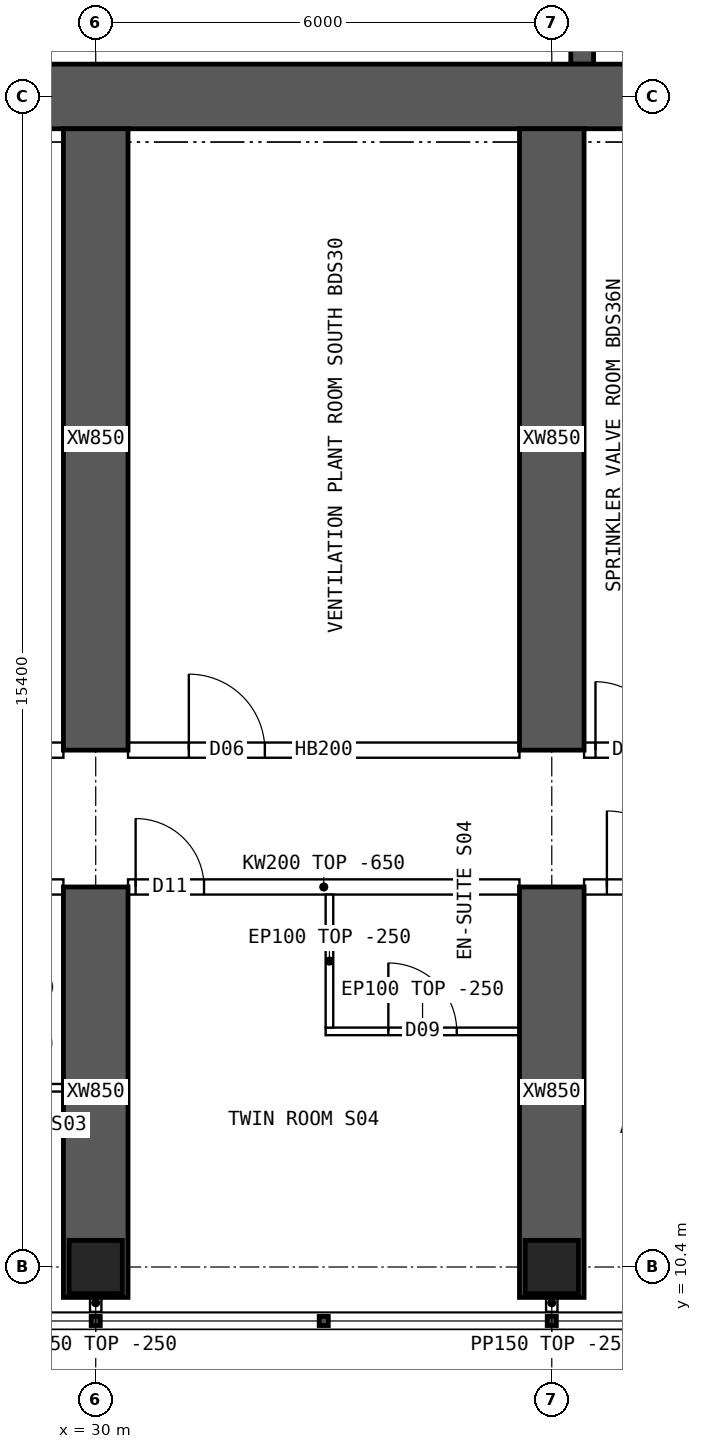
"""IFC4 building model, lengths in metres.
Left out: names, types, materials, properties, quantities, classifications, styles, units other than length and angle.
Written with IfcOpenShell. Run it as: python <this file> out.ifc"""

import sys

from ifc_helpers import new_model, si_unit, direction, frame, frame_2d, origin, origin_2d, place, context, subcontext, project, spatial, polyline, rectangle, hollow_rectangle, outline, extrude, element, fill, save


model = new_model("IFC4")
c1 = context("Model", 3, precision=1e-05, world=origin(), true_north=direction((0.0, 1.0)))
c2 = subcontext(c1, "Body", "Model", "MODEL_VIEW")
j1 = project(units=[si_unit("LENGTHUNIT", "METRE"), si_unit("PLANEANGLEUNIT", "RADIAN")], contexts=[c1])
p1 = place(None, origin())
s1 = spatial("IfcSite", under=j1, at=p1, CompositionType="ELEMENT")
p2 = place(p1, origin())
s2 = spatial("IfcBuilding", under=s1, at=p2, CompositionType="ELEMENT")
p3 = place(p2, frame((0.0, 0.0, 193.6)))
s3 = spatial("IfcBuildingStorey", under=s2, at=p3, CompositionType="ELEMENT", Elevation=193.6)
for number, where, z_axis, x_axis in (
    (1, (30.0, 10.4, 0.0), (0.0, 0.0, 1.0), (1.0, 0.0, 0.0)),
    (2, (36.0, 10.4, 0.0), (0.0, 0.0, 1.0), (1.0, 0.0, 0.0)),
):
    element("IfcColumn", number, at=place(p3, frame(where, z_axis=z_axis, x_axis=x_axis)), inside=s3, PredefinedType="COLUMN", context=c2, shape_type="SweptSolid", body=[
        extrude(hollow_rectangle(XDim=0.7, YDim=0.7, WallThickness=0.07, at=origin_2d()), origin(), (0.0, 0.0, 1.0), 3.75),
    ])
p4 = place(p3, frame((18.0, 25.8, 0.0), z_axis=(0.0, 0.0, 1.0), x_axis=(1.0, 0.0, 0.0)))
e3 = element("IfcWall", 3, at=p4, inside=s3, PredefinedType="SHEAR", context=c2, shape_type="SweptSolid", body=[
    extrude(rectangle(XDim=48.0, YDim=0.85, at=frame_2d((24.0, 0.0))), origin(), (0.0, 0.0, 1.0), 3.75),
])
p5 = place(p3, frame((36.4, 26.225, 0.0), z_axis=(0.0, 0.0, 1.0), x_axis=(0.0, 1.0, 0.0)))
e4 = element("IfcWall", 4, at=p5, inside=s3, PredefinedType="SHEAR", context=c2, shape_type="SweptSolid", body=[
    extrude(rectangle(XDim=4.025, YDim=0.3, at=frame_2d((2.012, 0.0))), origin(), (0.0, 0.0, 1.0), 3.75),
])
p6 = place(p3, frame((30.0, 10.0, 0.0), z_axis=(0.0, 0.0, 1.0), x_axis=(0.0, 1.0, 0.0)))
e5 = element("IfcWall", 5, at=p6, inside=s3, PredefinedType="SHEAR", context=c2, shape_type="SweptSolid", body=[
    extrude(rectangle(XDim=5.4, YDim=0.85, at=frame_2d((2.7, 0.0))), origin(), (0.0, 0.0, 1.0), 3.75),
])
p7 = place(p3, frame((30.0, 17.2, 0.0), z_axis=(0.0, 0.0, 1.0), x_axis=(0.0, 1.0, 0.0)))
e6 = element("IfcWall", 6, at=p7, inside=s3, PredefinedType="SHEAR", context=c2, shape_type="SweptSolid", body=[
    extrude(rectangle(XDim=8.175, YDim=0.85, at=frame_2d((4.087, 0.0))), origin(), (0.0, 0.0, 1.0), 3.75),
])
p8 = place(p3, frame((36.0, 10.0, 0.0), z_axis=(0.0, 0.0, 1.0), x_axis=(0.0, 1.0, 0.0)))
e7 = element("IfcWall", 7, at=p8, inside=s3, PredefinedType="SHEAR", context=c2, shape_type="SweptSolid", body=[
    extrude(rectangle(XDim=5.4, YDim=0.85, at=frame_2d((2.7, 0.0))), origin(), (0.0, 0.0, 1.0), 3.75),
])
p9 = place(p3, frame((36.0, 17.2, 0.0), z_axis=(0.0, 0.0, 1.0), x_axis=(0.0, 1.0, 0.0)))
e8 = element("IfcWall", 8, at=p9, inside=s3, PredefinedType="SHEAR", context=c2, shape_type="SweptSolid", body=[
    extrude(rectangle(XDim=8.175, YDim=0.85, at=frame_2d((4.087, 0.0))), origin(), (0.0, 0.0, 1.0), 3.75),
])
p10 = place(p3, frame((24.425, 15.4, 0.0), z_axis=(0.0, 0.0, 1.0), x_axis=(1.0, 0.0, 0.0)))
e9 = element("IfcWall", 9, at=p10, inside=s3, PredefinedType="SOLIDWALL", context=c2, shape_type="SweptSolid", body=[
    extrude(outline(polyline([(0.0, 0.0), (5.15, 0.0), (5.15, 3.1), (0.0, 3.1), (0.0, 0.0)])), frame((0.0, 0.1, 0.0), z_axis=(0.0, -1.0, 0.0), x_axis=(1.0, 0.0, 0.0)), (0.0, 0.0, 1.0), 0.2),
])
p11 = place(p10, frame((1.3, 0.0, 0.0)))
e10 = element("IfcOpeningElement", 10, at=p11, cuts=e9, PredefinedType="OPENING", context=c2, shape_type="SweptSolid", body=[
    extrude(rectangle(XDim=0.9, YDim=2.1, at=frame_2d((0.45, 1.05))), frame((0.0, 0.11, 0.0), z_axis=(0.0, -1.0, 0.0), x_axis=(1.0, 0.0, 0.0)), (0.0, 0.0, 1.0), 0.22),
])
p12 = place(p10, frame((2.75, 0.0, 0.0)))
e11 = element("IfcOpeningElement", 11, at=p12, cuts=e9, PredefinedType="OPENING", context=c2, shape_type="SweptSolid", body=[
    extrude(rectangle(XDim=0.9, YDim=2.1, at=frame_2d((0.45, 1.05))), frame((0.0, 0.11, 0.0), z_axis=(0.0, -1.0, 0.0), x_axis=(1.0, 0.0, 0.0)), (0.0, 0.0, 1.0), 0.22),
])
p13 = place(p3, frame((24.425, 17.2, 0.0), z_axis=(0.0, 0.0, 1.0), x_axis=(1.0, 0.0, 0.0)))
e12 = element("IfcWall", 12, at=p13, inside=s3, PredefinedType="SOLIDWALL", context=c2, shape_type="SweptSolid", body=[
    extrude(rectangle(XDim=5.15, YDim=0.2, at=frame_2d((2.575, 0.0))), origin(), (0.0, 0.0, 1.0), 3.5),
])
p14 = place(p13, frame((0.45, 0.0, 0.0)))
e13 = element("IfcOpeningElement", 13, at=p14, cuts=e12, PredefinedType="OPENING", context=c2, shape_type="SweptSolid", body=[
    extrude(rectangle(XDim=1.0, YDim=2.1, at=frame_2d((0.5, 1.05))), frame((0.0, 0.11, 0.0), z_axis=(0.0, -1.0, 0.0), x_axis=(1.0, 0.0, 0.0)), (0.0, 0.0, 1.0), 0.22),
])
p15 = place(p3, frame((30.425, 15.4, 0.0), z_axis=(0.0, 0.0, 1.0), x_axis=(1.0, 0.0, 0.0)))
e14 = element("IfcWall", 14, at=p15, inside=s3, PredefinedType="SOLIDWALL", context=c2, shape_type="SweptSolid", body=[
    extrude(outline(polyline([(0.0, 0.0), (5.15, 0.0), (5.15, 3.1), (0.0, 3.1), (0.0, 0.0)])), frame((0.0, 0.1, 0.0), z_axis=(0.0, -1.0, 0.0), x_axis=(1.0, 0.0, 0.0)), (0.0, 0.0, 1.0), 0.2),
])
p16 = place(p15, frame((0.1, 0.0, 0.0)))
e15 = element("IfcOpeningElement", 15, at=p16, cuts=e14, PredefinedType="OPENING", context=c2, shape_type="SweptSolid", body=[
    extrude(rectangle(XDim=0.9, YDim=2.1, at=frame_2d((0.45, 1.05))), frame((0.0, 0.11, 0.0), z_axis=(0.0, -1.0, 0.0), x_axis=(1.0, 0.0, 0.0)), (0.0, 0.0, 1.0), 0.22),
])
p17 = place(p3, frame((30.425, 17.2, 0.0), z_axis=(0.0, 0.0, 1.0), x_axis=(1.0, 0.0, 0.0)))
e16 = element("IfcWall", 16, at=p17, inside=s3, PredefinedType="SOLIDWALL", context=c2, shape_type="SweptSolid", body=[
    extrude(rectangle(XDim=5.15, YDim=0.2, at=frame_2d((2.575, 0.0))), origin(), (0.0, 0.0, 1.0), 3.5),
])
p18 = place(p17, frame((0.8, 0.0, 0.0)))
e17 = element("IfcOpeningElement", 17, at=p18, cuts=e16, PredefinedType="OPENING", context=c2, shape_type="SweptSolid", body=[
    extrude(rectangle(XDim=1.0, YDim=2.1, at=frame_2d((0.5, 1.05))), frame((0.0, 0.11, 0.0), z_axis=(0.0, -1.0, 0.0), x_axis=(1.0, 0.0, 0.0)), (0.0, 0.0, 1.0), 0.22),
])
p19 = place(p3, frame((36.425, 15.4, 0.0), z_axis=(0.0, 0.0, 1.0), x_axis=(1.0, 0.0, 0.0)))
e18 = element("IfcWall", 18, at=p19, inside=s3, PredefinedType="SOLIDWALL", context=c2, shape_type="SweptSolid", body=[
    extrude(outline(polyline([(0.0, 0.0), (5.15, 0.0), (5.15, 3.1), (0.0, 3.1), (0.0, 0.0)])), frame((0.0, 0.1, 0.0), z_axis=(0.0, -1.0, 0.0), x_axis=(1.0, 0.0, 0.0)), (0.0, 0.0, 1.0), 0.2),
])
p20 = place(p19, frame((0.3, 0.0, 0.0)))
e19 = element("IfcOpeningElement", 19, at=p20, cuts=e18, PredefinedType="OPENING", context=c2, shape_type="SweptSolid", body=[
    extrude(rectangle(XDim=1.0, YDim=2.1, at=frame_2d((0.5, 1.05))), frame((0.0, 0.11, 0.0), z_axis=(0.0, -1.0, 0.0), x_axis=(1.0, 0.0, 0.0)), (0.0, 0.0, 1.0), 0.22),
])
p21 = place(p3, frame((36.425, 17.2, 0.0), z_axis=(0.0, 0.0, 1.0), x_axis=(1.0, 0.0, 0.0)))
e20 = element("IfcWall", 20, at=p21, inside=s3, PredefinedType="SOLIDWALL", context=c2, shape_type="SweptSolid", body=[
    extrude(rectangle(XDim=5.15, YDim=0.2, at=frame_2d((2.575, 0.0))), origin(), (0.0, 0.0, 1.0), 3.5),
])
p22 = place(p21, frame((0.15, 0.0, 0.0)))
e21 = element("IfcOpeningElement", 21, at=p22, cuts=e20, PredefinedType="OPENING", context=c2, shape_type="SweptSolid", body=[
    extrude(rectangle(XDim=0.9, YDim=2.1, at=frame_2d((0.45, 1.05))), frame((0.0, 0.11, 0.0), z_axis=(0.0, -1.0, 0.0), x_axis=(1.0, 0.0, 0.0)), (0.0, 0.0, 1.0), 0.22),
])
p23 = place(p21, frame((2.265, 0.0, 0.0)))
e22 = element("IfcOpeningElement", 22, at=p23, cuts=e20, PredefinedType="OPENING", context=c2, shape_type="SweptSolid", body=[
    extrude(rectangle(XDim=0.9, YDim=2.1, at=frame_2d((0.45, 1.05))), frame((0.0, 0.11, 0.0), z_axis=(0.0, -1.0, 0.0), x_axis=(1.0, 0.0, 0.0)), (0.0, 0.0, 1.0), 0.22),
])
p24 = place(p3, frame((29.575, 12.758, 0.0), z_axis=(0.0, 0.0, 1.0), x_axis=(-1.0, 0.0, 0.0)))
e23 = element("IfcWall", 23, at=p24, inside=s3, PredefinedType="PARTITIONING", context=c2, shape_type="SweptSolid", body=[
    extrude(rectangle(XDim=1.25, YDim=0.1, at=frame_2d((0.625, 0.0))), origin(), (0.0, 0.0, 1.0), 3.5),
])
p25 = place(p24, frame((0.175, 0.0, 0.0)))
e24 = element("IfcOpeningElement", 24, at=p25, cuts=e23, PredefinedType="OPENING", context=c2, shape_type="SweptSolid", body=[
    extrude(rectangle(XDim=0.9, YDim=2.1, at=frame_2d((0.45, 1.05))), frame((0.0, 0.06, 0.0), z_axis=(0.0, -1.0, 0.0), x_axis=(1.0, 0.0, 0.0)), (0.0, 0.0, 1.0), 0.12),
])
p26 = place(p3, frame((35.575, 13.5, 0.0), z_axis=(0.0, 0.0, 1.0), x_axis=(-1.0, 0.0, 0.0)))
e25 = element("IfcWall", 25, at=p26, inside=s3, PredefinedType="PARTITIONING", context=c2, shape_type="SweptSolid", body=[
    extrude(rectangle(XDim=2.55, YDim=0.1, at=frame_2d((1.275, 0.0))), origin(), (0.0, 0.0, 1.0), 3.5),
])
p27 = place(p26, frame((0.825, 0.0, 0.0)))
e26 = element("IfcOpeningElement", 26, at=p27, cuts=e25, PredefinedType="OPENING", context=c2, shape_type="SweptSolid", body=[
    extrude(rectangle(XDim=0.9, YDim=2.1, at=frame_2d((0.45, 1.05))), frame((0.0, 0.06, 0.0), z_axis=(0.0, -1.0, 0.0), x_axis=(1.0, 0.0, 0.0)), (0.0, 0.0, 1.0), 0.12),
])
p28 = place(p3, frame((33.075, 13.55, 0.0), z_axis=(0.0, 0.0, 1.0), x_axis=(0.0, 1.0, 0.0)))
e27 = element("IfcWall", 27, at=p28, inside=s3, PredefinedType="PARTITIONING", context=c2, shape_type="SweptSolid", body=[
    extrude(outline(polyline([(0.0, 0.0), (1.75, 0.0), (1.75, 3.1), (1.702, 3.1), (1.7, 3.5), (0.0, 3.5), (0.0, 0.0)])), frame((0.0, 0.05, 0.0), z_axis=(0.0, -1.0, 0.0), x_axis=(1.0, 0.0, 0.0)), (0.0, 0.0, 1.0), 0.1),
])
for number, where, z_axis, x_axis in (
    (28, (30.0, 10.05, 0.0), (0.0, 0.0, 1.0), (0.0, -1.0, 0.0)),
    (29, (36.0, 10.05, 0.0), (0.0, 0.0, 1.0), (0.0, -1.0, 0.0)),
):
    element("IfcWall", number, at=place(p3, frame(where, z_axis=z_axis, x_axis=x_axis)), inside=s3, PredefinedType="PARTITIONING", context=c2, shape_type="SweptSolid", body=[
        extrude(rectangle(XDim=0.24, YDim=0.15, at=frame_2d((0.12, 0.0))), origin(), (0.0, 0.0, 1.0), 3.5),
    ])
p29 = place(p27, origin())
e30 = element("IfcDoor", 30, at=p29, inside=s3, OperationType="SINGLE_SWING_RIGHT", PredefinedType="DOOR", context=c2, shape_type="SweptSolid", body=[
    extrude(rectangle(XDim=0.9, YDim=2.1, at=frame_2d((0.45, 1.05))), frame((0.0, 0.025, 0.0), z_axis=(0.0, -1.0, 0.0), x_axis=(1.0, 0.0, 0.0)), (0.0, 0.0, 1.0), 0.05),
])
fill(e26, e30)
p30 = place(p16, origin())
e31 = element("IfcDoor", 31, at=p30, inside=s3, OperationType="SINGLE_SWING_LEFT", PredefinedType="DOOR", context=c2, shape_type="SweptSolid", body=[
    extrude(rectangle(XDim=0.9, YDim=2.1, at=frame_2d((0.45, 1.05))), frame((0.0, 0.025, 0.0), z_axis=(0.0, -1.0, 0.0), x_axis=(1.0, 0.0, 0.0)), (0.0, 0.0, 1.0), 0.05),
])
fill(e15, e31)
p31 = place(p20, origin())
e32 = element("IfcDoor", 32, at=p31, inside=s3, OperationType="SINGLE_SWING_LEFT", PredefinedType="DOOR", context=c2, shape_type="SweptSolid", body=[
    extrude(rectangle(XDim=1.0, YDim=2.1, at=frame_2d((0.5, 1.05))), frame((0.0, 0.025, 0.0), z_axis=(0.0, -1.0, 0.0), x_axis=(1.0, 0.0, 0.0)), (0.0, 0.0, 1.0), 0.05),
])
fill(e19, e32)
p32 = place(p18, origin())
e33 = element("IfcDoor", 33, at=p32, inside=s3, OperationType="SINGLE_SWING_LEFT", PredefinedType="DOOR", context=c2, shape_type="SweptSolid", body=[
    extrude(rectangle(XDim=1.0, YDim=2.1, at=frame_2d((0.5, 1.05))), frame((0.0, 0.025, 0.0), z_axis=(0.0, -1.0, 0.0), x_axis=(1.0, 0.0, 0.0)), (0.0, 0.0, 1.0), 0.05),
])
fill(e17, e33)
p33 = place(p22, origin())
e34 = element("IfcDoor", 34, at=p33, inside=s3, OperationType="SINGLE_SWING_LEFT", PredefinedType="DOOR", context=c2, shape_type="SweptSolid", body=[
    extrude(rectangle(XDim=0.9, YDim=2.1, at=frame_2d((0.45, 1.05))), frame((0.0, 0.025, 0.0), z_axis=(0.0, -1.0, 0.0), x_axis=(1.0, 0.0, 0.0)), (0.0, 0.0, 1.0), 0.05),
])
fill(e21, e34)
save(model, sys.argv[1])
